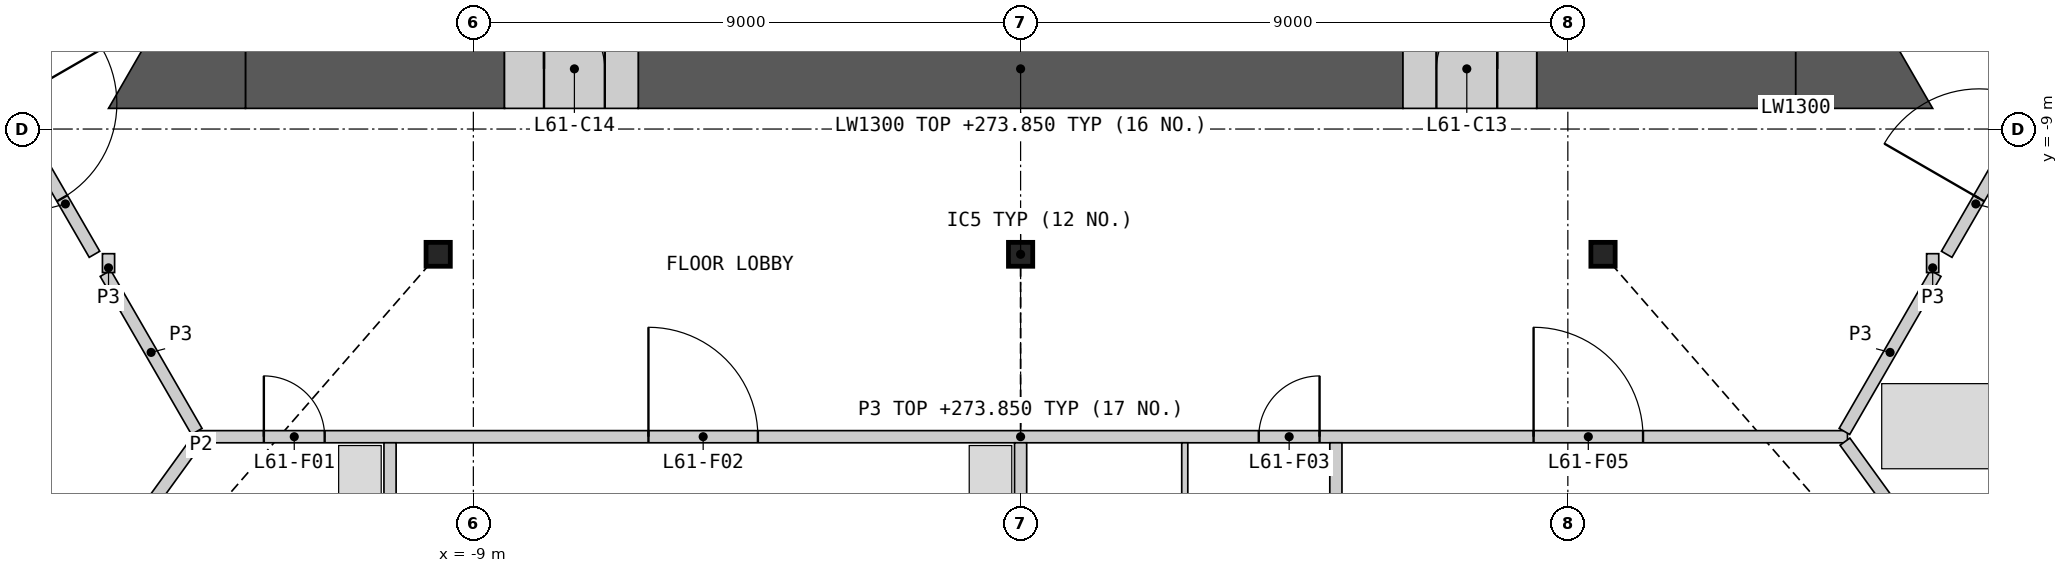
"""IFC4 building model, lengths in metres.
Left out: names, types, materials, properties, quantities, classifications, styles, units other than length and angle.
Written with IfcOpenShell. Run it as: python <this file> out.ifc"""

import sys

from ifc_helpers import new_model, si_unit, direction, frame, frame_2d, origin, origin_2d, place, context, subcontext, project, spatial, polyline, rectangle, i_section, outline, extrude, element, fill, save


model = new_model("IFC4")
c1 = context("Model", 3, precision=1e-05, world=origin(), true_north=direction((0.0, 1.0)))
c2 = subcontext(c1, "Body", "Model", "MODEL_VIEW")
j1 = project(units=[si_unit("LENGTHUNIT", "METRE"), si_unit("PLANEANGLEUNIT", "RADIAN")], contexts=[c1])
p1 = place(None, origin())
s1 = spatial("IfcSite", under=j1, at=p1, CompositionType="ELEMENT")
p2 = place(p1, origin())
s2 = spatial("IfcBuilding", under=s1, at=p2, CompositionType="ELEMENT")
p3 = place(p2, frame((0.0, 0.0, 270.6)))
s3 = spatial("IfcBuildingStorey", under=s2, at=p3, CompositionType="ELEMENT", Elevation=270.6)
for number, where, z_axis, x_axis in (
    (1, (-9.578, -11.06, 0.0), (0.0, 0.0, 1.0), (1.0, 0.0, 0.0)),
    (2, (0.0, -11.06, 0.0), (0.0, 0.0, 1.0), (1.0, 0.0, 0.0)),
    (3, (9.578, -11.06, 0.0), (0.0, 0.0, 1.0), (1.0, 0.0, 0.0)),
):
    element("IfcColumn", number, at=place(p3, frame(where, z_axis=z_axis, x_axis=x_axis)), inside=s3, PredefinedType="COLUMN", context=c2, shape_type="SweptSolid", body=[
        extrude(i_section(OverallWidth=0.399, OverallDepth=0.393, WebThickness=0.023, FlangeThickness=0.037, at=origin_2d()), origin(), (0.0, 0.0, 1.0), 3.6),
    ])
p4 = place(p3, frame((-6.288, -8.01, 0.0), z_axis=(0.0, 0.0, 1.0), x_axis=(1.0, 0.0, 0.0)))
e4 = element("IfcWall", 4, at=p4, inside=s3, PredefinedType="SHEAR", context=c2, shape_type="SweptSolid", body=[
    extrude(rectangle(XDim=12.576, YDim=1.3, at=frame_2d((6.288, 0.0))), origin(), (0.0, 0.0, 1.0), 3.25),
])
for number, where, z_axis, x_axis in (
    (5, (8.488, -8.01, 0.0), (0.0, 0.0, 1.0), (1.0, 0.0, 0.0)),
    (6, (-12.748, -8.01, 0.0), (0.0, 0.0, 1.0), (1.0, 0.0, 0.0)),
):
    element("IfcWall", number, at=place(p3, frame(where, z_axis=z_axis, x_axis=x_axis)), inside=s3, PredefinedType="SHEAR", context=c2, shape_type="SweptSolid", body=[
        extrude(rectangle(XDim=4.26, YDim=1.3, at=frame_2d((2.13, 0.0))), origin(), (0.0, 0.0, 1.0), 3.25),
    ])
p5 = place(p3, origin())
e7 = element("IfcWall", 7, at=p5, inside=s3, PredefinedType="SHEAR", context=c2, shape_type="SweptSolid", body=[
    extrude(outline(polyline([(12.748, -8.66), (12.748, -7.36), (13.874, -6.71), (15.0, -8.66), (12.748, -8.66)])), origin(), (0.0, 0.0, 1.0), 3.25),
])
p6 = place(p3, origin())
e8 = element("IfcWall", 8, at=p6, inside=s3, PredefinedType="SHEAR", context=c2, shape_type="SweptSolid", body=[
    extrude(outline(polyline([(-13.874, -6.71), (-12.748, -7.36), (-12.748, -8.66), (-15.0, -8.66), (-13.874, -6.71)])), origin(), (0.0, 0.0, 1.0), 3.25),
])
p7 = place(p3, frame((6.288, -8.01, 0.0), z_axis=(0.0, 0.0, 1.0), x_axis=(1.0, 0.0, 0.0)))
e9 = element("IfcWall", 9, at=p7, inside=s3, PredefinedType="SHEAR", context=c2, shape_type="SweptSolid", body=[
    extrude(rectangle(XDim=2.2, YDim=1.3, at=frame_2d((1.1, 0.0))), origin(), (0.0, 0.0, 1.0), 3.25),
])
p8 = place(p7, frame((0.55, 0.0, 0.0)))
e10 = element("IfcOpeningElement", 10, at=p8, cuts=e9, PredefinedType="OPENING", context=c2, shape_type="SweptSolid", body=[
    extrude(rectangle(XDim=1.0, YDim=2.1, at=frame_2d((0.5, 1.05))), frame((0.0, 0.66, 0.0), z_axis=(0.0, -1.0, 0.0), x_axis=(1.0, 0.0, 0.0)), (0.0, 0.0, 1.0), 1.32),
])
p9 = place(p3, frame((-8.488, -8.01, 0.0), z_axis=(0.0, 0.0, 1.0), x_axis=(1.0, 0.0, 0.0)))
e11 = element("IfcWall", 11, at=p9, inside=s3, PredefinedType="SHEAR", context=c2, shape_type="SweptSolid", body=[
    extrude(rectangle(XDim=2.2, YDim=1.3, at=frame_2d((1.1, 0.0))), origin(), (0.0, 0.0, 1.0), 3.25),
])
p10 = place(p9, frame((0.65, 0.0, 0.0)))
e12 = element("IfcOpeningElement", 12, at=p10, cuts=e11, PredefinedType="OPENING", context=c2, shape_type="SweptSolid", body=[
    extrude(rectangle(XDim=1.0, YDim=2.1, at=frame_2d((0.5, 1.05))), frame((0.0, 0.66, 0.0), z_axis=(0.0, -1.0, 0.0), x_axis=(1.0, 0.0, 0.0)), (0.0, 0.0, 1.0), 1.32),
])
p11 = place(p3, frame((-13.599, -14.06, 0.0), z_axis=(0.0, 0.0, 1.0), x_axis=(1.0, 0.0, 0.0)))
e13 = element("IfcWall", 13, at=p11, inside=s3, PredefinedType="PARTITIONING", context=c2, shape_type="SweptSolid", body=[
    extrude(rectangle(XDim=27.198, YDim=0.2, at=frame_2d((13.599, 0.0))), origin(), (0.0, 0.0, 1.0), 3.25),
])
p12 = place(p11, frame((1.153, 0.0, 0.0)))
e14 = element("IfcOpeningElement", 14, at=p12, cuts=e13, PredefinedType="OPENING", context=c2, shape_type="SweptSolid", body=[
    extrude(rectangle(XDim=1.0, YDim=2.1, at=frame_2d((0.5, 1.05))), frame((0.0, 0.11, 0.0), z_axis=(0.0, -1.0, 0.0), x_axis=(1.0, 0.0, 0.0)), (0.0, 0.0, 1.0), 0.22),
])
p13 = place(p11, frame((7.478, 0.0, 0.0)))
e15 = element("IfcOpeningElement", 15, at=p13, cuts=e13, PredefinedType="OPENING", context=c2, shape_type="SweptSolid", body=[
    extrude(rectangle(XDim=1.8, YDim=2.1, at=frame_2d((0.9, 1.05))), frame((0.0, 0.11, 0.0), z_axis=(0.0, -1.0, 0.0), x_axis=(1.0, 0.0, 0.0)), (0.0, 0.0, 1.0), 0.22),
])
p14 = place(p11, frame((17.516, 0.0, 0.0)))
e16 = element("IfcOpeningElement", 16, at=p14, cuts=e13, PredefinedType="OPENING", context=c2, shape_type="SweptSolid", body=[
    extrude(rectangle(XDim=1.0, YDim=2.1, at=frame_2d((0.5, 1.05))), frame((0.0, 0.11, 0.0), z_axis=(0.0, -1.0, 0.0), x_axis=(1.0, 0.0, 0.0)), (0.0, 0.0, 1.0), 0.22),
])
p15 = place(p11, frame((22.036, 0.0, 0.0)))
e17 = element("IfcOpeningElement", 17, at=p15, cuts=e13, PredefinedType="OPENING", context=c2, shape_type="SweptSolid", body=[
    extrude(rectangle(XDim=1.8, YDim=2.1, at=frame_2d((0.9, 1.05))), frame((0.0, 0.11, 0.0), z_axis=(0.0, -1.0, 0.0), x_axis=(1.0, 0.0, 0.0)), (0.0, 0.0, 1.0), 0.22),
])
p16 = place(p3, frame((-17.244, -7.747, 0.0), z_axis=(0.0, 0.0, 1.0), x_axis=(0.500017753321, 0.866015153657, 0.0)))
e18 = element("IfcWall", 18, at=p16, inside=s3, PredefinedType="PARTITIONING", context=c2, shape_type="SweptSolid", body=[
    extrude(rectangle(XDim=5.51, YDim=0.2, at=frame_2d((2.755, 0.0))), origin(), (0.0, 0.0, 1.0), 3.25),
])
p17 = place(p16, frame((1.956, 0.0, 0.0)))
e19 = element("IfcOpeningElement", 19, at=p17, cuts=e18, PredefinedType="OPENING", context=c2, shape_type="SweptSolid", body=[
    extrude(rectangle(XDim=1.8, YDim=2.1, at=frame_2d((0.9, 1.05))), frame((0.0, 0.11, 0.0), z_axis=(0.0, -1.0, 0.0), x_axis=(1.0, 0.0, 0.0)), (0.0, 0.0, 1.0), 0.22),
])
p18 = place(p3, frame((14.806, -3.524, 0.0), z_axis=(0.0, 0.0, 1.0), x_axis=(0.499999813892, -0.866025511234, 0.0)))
e20 = element("IfcWall", 20, at=p18, inside=s3, PredefinedType="PARTITIONING", context=c2, shape_type="SweptSolid", body=[
    extrude(rectangle(XDim=4.876, YDim=0.2, at=frame_2d((2.438, 0.0))), origin(), (0.0, 0.0, 1.0), 3.25),
])
p19 = place(p18, frame((3.37, 0.0, 0.0)))
e21 = element("IfcOpeningElement", 21, at=p19, cuts=e20, PredefinedType="OPENING", context=c2, shape_type="SweptSolid", body=[
    extrude(rectangle(XDim=1.1, YDim=2.1, at=frame_2d((0.55, 1.05))), frame((0.0, 0.11, 0.0), z_axis=(0.0, -1.0, 0.0), x_axis=(1.0, 0.0, 0.0)), (0.0, 0.0, 1.0), 0.22),
])
p20 = place(p3, frame((15.231, -11.06, 0.0), z_axis=(0.0, 0.0, 1.0), x_axis=(0.499961815444, 0.866047448526, 0.0)))
e22 = element("IfcWall", 22, at=p20, inside=s3, PredefinedType="PARTITIONING", context=c2, shape_type="SweptSolid", body=[
    extrude(rectangle(XDim=3.826, YDim=0.2, at=frame_2d((1.913, 0.0))), origin(), (0.0, 0.0, 1.0), 3.25),
])
p21 = place(p20, frame((1.064, 0.0, 0.0)))
e23 = element("IfcOpeningElement", 23, at=p21, cuts=e22, PredefinedType="OPENING", context=c2, shape_type="SweptSolid", body=[
    extrude(rectangle(XDim=1.8, YDim=2.1, at=frame_2d((0.9, 1.05))), frame((0.0, 0.11, 0.0), z_axis=(0.0, -1.0, 0.0), x_axis=(1.0, 0.0, 0.0)), (0.0, 0.0, 1.0), 0.22),
])
p22 = place(p3, frame((-17.144, -7.747, 0.0), z_axis=(0.0, 0.0, 1.0), x_axis=(0.499961815444, -0.866047448526, 0.0)))
e24 = element("IfcWall", 24, at=p22, inside=s3, PredefinedType="PARTITIONING", context=c2, shape_type="SweptSolid", body=[
    extrude(rectangle(XDim=3.826, YDim=0.2, at=frame_2d((1.913, 0.0))), origin(), (0.0, 0.0, 1.0), 3.25),
])
p23 = place(p22, frame((0.962, 0.0, 0.0)))
e25 = element("IfcOpeningElement", 25, at=p23, cuts=e24, PredefinedType="OPENING", context=c2, shape_type="SweptSolid", body=[
    extrude(rectangle(XDim=1.8, YDim=2.1, at=frame_2d((0.9, 1.05))), frame((0.0, 0.11, 0.0), z_axis=(0.0, -1.0, 0.0), x_axis=(1.0, 0.0, 0.0)), (0.0, 0.0, 1.0), 0.22),
])
for number, where, z_axis, x_axis in (
    (26, (13.549, -13.974, 0.0), (0.0, 0.0, 1.0), (0.5, 0.866, 0.0)),
    (27, (-15.05, -11.374, 0.0), (0.0, 0.0, 1.0), (0.5, -0.866, 0.0)),
):
    element("IfcWall", number, at=place(p3, frame(where, z_axis=z_axis, x_axis=x_axis)), inside=s3, PredefinedType="PARTITIONING", context=c2, shape_type="SweptSolid", body=[
        extrude(rectangle(XDim=3.002, YDim=0.2, at=frame_2d((1.501, 0.0))), origin(), (0.0, 0.0, 1.0), 3.25),
    ])
for number, where, z_axis, x_axis in (
    (28, (15.0, -11.36, 0.0), (0.0, 0.0, 1.0), (0.0, 1.0, 0.0)),
    (29, (-15.0, -11.36, 0.0), (0.0, 0.0, 1.0), (0.0, 1.0, 0.0)),
):
    element("IfcWall", number, at=place(p3, frame(where, z_axis=z_axis, x_axis=x_axis)), inside=s3, PredefinedType="PARTITIONING", context=c2, shape_type="SweptSolid", body=[
        extrude(rectangle(XDim=0.31, YDim=0.2, at=frame_2d((0.155, 0.0))), origin(), (0.0, 0.0, 1.0), 3.25),
    ])
p24 = place(p3, frame((13.557, -14.141, 0.0), z_axis=(0.0, 0.0, 1.0), x_axis=(0.586363418846, -0.810048110324, 0.0)))
e30 = element("IfcWall", 30, at=p24, inside=s3, PredefinedType="PARTITIONING", context=c2, shape_type="SweptSolid", body=[
    extrude(rectangle(XDim=11.658, YDim=0.2, at=frame_2d((5.829, 0.0))), origin(), (0.0, 0.0, 1.0), 2.404),
])
p25 = place(p3, origin())
e31 = element("IfcWall", 31, at=p25, inside=s3, PredefinedType="PARTITIONING", context=c2, shape_type="SweptSolid", body=[
    extrude(outline(polyline([(-13.476, -14.2), (-19.723, -22.83), (-20.432, -23.468), (-13.638, -14.083), (-13.476, -14.2)])), origin(), (0.0, 0.0, 1.0), 2.404),
])
for number, where, z_axis, x_axis in (
    (32, (-10.37, -23.527, 0.0), (0.0, 0.0, 1.0), (0.0, 1.0, 0.0)),
    (33, (0.0, -23.527, 0.0), (0.0, 0.0, 1.0), (0.0, 1.0, 0.0)),
):
    element("IfcWall", number, at=place(p3, frame(where, z_axis=z_axis, x_axis=x_axis)), inside=s3, PredefinedType="PARTITIONING", context=c2, shape_type="SweptSolid", body=[
        extrude(rectangle(XDim=9.366, YDim=0.2, at=frame_2d((4.683, 0.0))), origin(), (0.0, 0.0, 1.0), 2.404),
    ])
p26 = place(p3, frame((5.185, -18.855, 0.0), z_axis=(0.0, 0.0, 1.0), x_axis=(0.0, 1.0, 0.0)))
e34 = element("IfcWall", 34, at=p26, inside=s3, PredefinedType="PARTITIONING", context=c2, shape_type="SweptSolid", body=[
    extrude(rectangle(XDim=4.695, YDim=0.2, at=frame_2d((2.348, 0.0))), origin(), (0.0, 0.0, 1.0), 2.404),
])
p27 = place(p3, frame((2.7, -16.61, 0.0), z_axis=(0.0, 0.0, 1.0), x_axis=(0.0, 1.0, 0.0)))
e35 = element("IfcWall", 35, at=p27, inside=s3, PredefinedType="PARTITIONING", context=c2, shape_type="SweptSolid", body=[
    extrude(rectangle(XDim=2.45, YDim=0.1, at=frame_2d((1.225, 0.0))), origin(), (0.0, 0.0, 1.0), 2.404),
])
p28 = place(p12, origin())
e36 = element("IfcDoor", 36, at=p28, inside=s3, OperationType="SINGLE_SWING_LEFT", PredefinedType="DOOR", context=c2, shape_type="SweptSolid", body=[
    extrude(rectangle(XDim=1.0, YDim=2.1, at=frame_2d((0.5, 1.05))), frame((0.0, 0.025, 0.0), z_axis=(0.0, -1.0, 0.0), x_axis=(1.0, 0.0, 0.0)), (0.0, 0.0, 1.0), 0.05),
])
fill(e14, e36)
p29 = place(p13, origin())
e37 = element("IfcDoor", 37, at=p29, inside=s3, OperationType="DOUBLE_DOOR_SINGLE_SWING", PredefinedType="DOOR", context=c2, shape_type="SweptSolid", body=[
    extrude(rectangle(XDim=1.8, YDim=2.1, at=frame_2d((0.9, 1.05))), frame((0.0, 0.025, 0.0), z_axis=(0.0, -1.0, 0.0), x_axis=(1.0, 0.0, 0.0)), (0.0, 0.0, 1.0), 0.05),
])
fill(e15, e37)
p30 = place(p14, origin())
e38 = element("IfcDoor", 38, at=p30, inside=s3, OperationType="SINGLE_SWING_RIGHT", PredefinedType="DOOR", context=c2, shape_type="SweptSolid", body=[
    extrude(rectangle(XDim=1.0, YDim=2.1, at=frame_2d((0.5, 1.05))), frame((0.0, 0.025, 0.0), z_axis=(0.0, -1.0, 0.0), x_axis=(1.0, 0.0, 0.0)), (0.0, 0.0, 1.0), 0.05),
])
fill(e16, e38)
p31 = place(p15, origin())
e39 = element("IfcDoor", 39, at=p31, inside=s3, OperationType="DOUBLE_DOOR_SINGLE_SWING", PredefinedType="DOOR", context=c2, shape_type="SweptSolid", body=[
    extrude(rectangle(XDim=1.8, YDim=2.1, at=frame_2d((0.9, 1.05))), frame((0.0, 0.025, 0.0), z_axis=(0.0, -1.0, 0.0), x_axis=(1.0, 0.0, 0.0)), (0.0, 0.0, 1.0), 0.05),
])
fill(e17, e39)
p32 = place(p21, origin())
e40 = element("IfcDoor", 40, at=p32, inside=s3, OperationType="DOUBLE_DOOR_SINGLE_SWING", PredefinedType="DOOR", context=c2, shape_type="SweptSolid", body=[
    extrude(rectangle(XDim=1.8, YDim=2.1, at=frame_2d((0.9, 1.05))), frame((0.0, 0.025, 0.0), z_axis=(0.0, -1.0, 0.0), x_axis=(1.0, 0.0, 0.0)), (0.0, 0.0, 1.0), 0.05),
])
fill(e23, e40)
p33 = place(p23, origin())
e41 = element("IfcDoor", 41, at=p33, inside=s3, OperationType="DOUBLE_DOOR_SINGLE_SWING", PredefinedType="DOOR", context=c2, shape_type="SweptSolid", body=[
    extrude(rectangle(XDim=1.8, YDim=2.1, at=frame_2d((0.9, 1.05))), frame((0.0, 0.025, 0.0), z_axis=(0.0, -1.0, 0.0), x_axis=(1.0, 0.0, 0.0)), (0.0, 0.0, 1.0), 0.05),
])
fill(e25, e41)
save(model, sys.argv[1])
